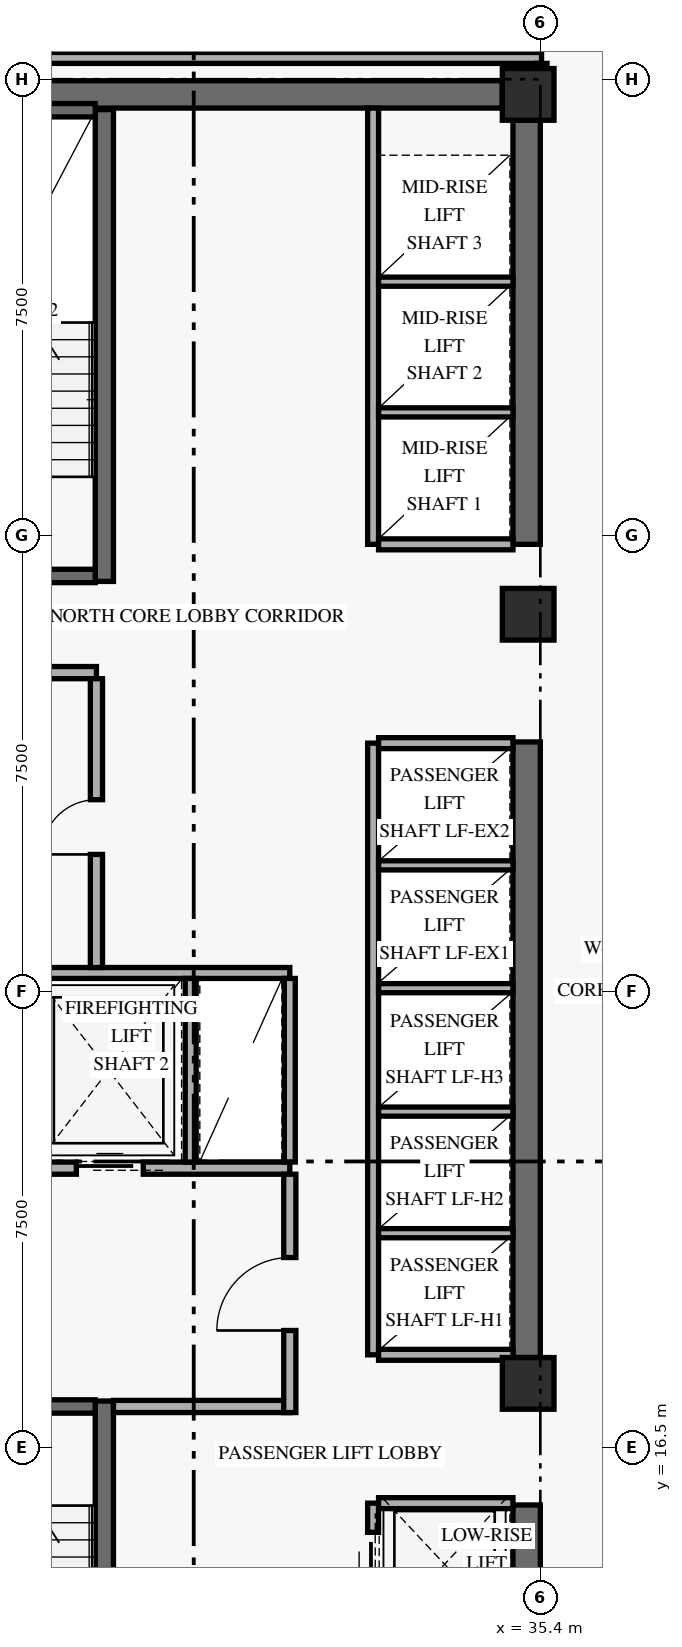
"""IFC4 building model, lengths in metres.
Left out: names, types, materials, properties, quantities, classifications, styles, units other than length and angle.
Written with IfcOpenShell. Run it as: python <this file> out.ifc"""

import sys

from ifc_helpers import new_model, si_unit, direction, frame, frame_2d, origin, origin_2d, place, context, subcontext, project, spatial, rectangle, extrude, element, fill, save


model = new_model("IFC4")
c1 = context("Model", 3, precision=1e-05, world=origin(), true_north=direction((0.0, 1.0)))
c2 = subcontext(c1, "Body", "Model", "MODEL_VIEW")
j1 = project(units=[si_unit("LENGTHUNIT", "METRE"), si_unit("PLANEANGLEUNIT", "RADIAN")], contexts=[c1])
p1 = place(None, origin())
s1 = spatial("IfcSite", under=j1, at=p1, CompositionType="ELEMENT")
p2 = place(p1, origin())
s2 = spatial("IfcBuilding", under=s1, at=p2, CompositionType="ELEMENT")
p3 = place(p2, frame((0.0, 0.0, 45.6)))
s3 = spatial("IfcBuildingStorey", under=s2, at=p3, CompositionType="ELEMENT", Elevation=45.6)
p4 = place(p3, frame((35.175, 9.675, 0.0), z_axis=(0.0, 0.0, 1.0), x_axis=(0.0, 1.0, 0.0)))
e1 = element("IfcWall", 1, at=p4, inside=s3, PredefinedType="SHEAR", context=c2, shape_type="SweptSolid", body=[
    extrude(rectangle(XDim=5.875, YDim=0.45, at=frame_2d((2.938, 0.0))), origin(), (0.0, 0.0, 1.0), 2.667),
])
p5 = place(p3, frame((35.175, 17.975, 0.0), z_axis=(0.0, 0.0, 1.0), x_axis=(0.0, 1.0, 0.0)))
e2 = element("IfcWall", 2, at=p5, inside=s3, PredefinedType="SHEAR", context=c2, shape_type="SweptSolid", body=[
    extrude(rectangle(XDim=10.125, YDim=0.45, at=frame_2d((5.062, 0.0))), origin(), (0.0, 0.0, 1.0), 2.667),
])
p6 = place(p3, frame((35.175, 31.35, 0.0), z_axis=(0.0, 0.0, 1.0), x_axis=(0.0, 1.0, 0.0)))
e3 = element("IfcWall", 3, at=p6, inside=s3, PredefinedType="SHEAR", context=c2, shape_type="SweptSolid", body=[
    extrude(rectangle(XDim=6.975, YDim=0.45, at=frame_2d((3.487, 0.0))), origin(), (0.0, 0.0, 1.0), 2.667),
])
p7 = place(p3, frame((24.625, 38.75, 0.0), z_axis=(0.0, 0.0, 1.0), x_axis=(1.0, 0.0, 0.0)))
e4 = element("IfcWall", 4, at=p7, inside=s3, PredefinedType="SHEAR", context=c2, shape_type="SweptSolid", body=[
    extrude(rectangle(XDim=10.15, YDim=0.45, at=frame_2d((5.075, 0.0))), origin(), (0.0, 0.0, 1.0), 3.36),
])
p8 = place(p3, frame((28.23, 9.5, 0.0), z_axis=(0.0, 0.0, 1.0), x_axis=(0.0, 1.0, 0.0)))
e5 = element("IfcWall", 5, at=p8, inside=s3, PredefinedType="SHEAR", context=c2, shape_type="SweptSolid", body=[
    extrude(rectangle(XDim=7.76, YDim=0.3, at=frame_2d((3.88, 0.0))), origin(), (0.0, 0.0, 1.0), 3.36),
])
p9 = place(p3, frame((24.92, 17.17, 0.0), z_axis=(0.0, 0.0, 1.0), x_axis=(1.0, 0.0, 0.0)))
e6 = element("IfcWall", 6, at=p9, inside=s3, PredefinedType="SHEAR", context=c2, shape_type="SweptSolid", body=[
    extrude(rectangle(XDim=3.16, YDim=0.22, at=frame_2d((1.58, 0.0))), origin(), (0.0, 0.0, 1.0), 3.36),
])
p10 = place(p9, frame((0.78, 0.0, 0.0)))
e7 = element("IfcOpeningElement", 7, at=p10, cuts=e6, PredefinedType="OPENING", context=c2, shape_type="SweptSolid", body=[
    extrude(rectangle(XDim=1.05, YDim=2.15, at=frame_2d((0.525, 1.075))), frame((0.0, 0.12, 0.0), z_axis=(0.0, -1.0, 0.0), x_axis=(1.0, 0.0, 0.0)), (0.0, 0.0, 1.0), 0.24),
])
p11 = place(p3, frame((28.23, 30.74, 0.0), z_axis=(0.0, 0.0, 1.0), x_axis=(0.0, 1.0, 0.0)))
e8 = element("IfcWall", 8, at=p11, inside=s3, PredefinedType="SHEAR", context=c2, shape_type="SweptSolid", body=[
    extrude(rectangle(XDim=7.76, YDim=0.3, at=frame_2d((3.88, 0.0))), origin(), (0.0, 0.0, 1.0), 3.36),
])
p12 = place(p3, frame((24.92, 30.83, 0.0), z_axis=(0.0, 0.0, 1.0), x_axis=(1.0, 0.0, 0.0)))
e9 = element("IfcWall", 9, at=p12, inside=s3, PredefinedType="SHEAR", context=c2, shape_type="SweptSolid", body=[
    extrude(rectangle(XDim=3.16, YDim=0.22, at=frame_2d((1.58, 0.0))), origin(), (0.0, 0.0, 1.0), 3.36),
])
p13 = place(p12, frame((0.78, 0.0, 0.0)))
e10 = element("IfcOpeningElement", 10, at=p13, cuts=e9, PredefinedType="OPENING", context=c2, shape_type="SweptSolid", body=[
    extrude(rectangle(XDim=1.05, YDim=2.15, at=frame_2d((0.525, 1.075))), frame((0.0, 0.12, 0.0), z_axis=(0.0, -1.0, 0.0), x_axis=(1.0, 0.0, 0.0)), (0.0, 0.0, 1.0), 0.24),
])
p14 = place(p3, frame((24.92, 38.49, 0.0), z_axis=(0.0, 0.0, 1.0), x_axis=(1.0, 0.0, 0.0)))
e11 = element("IfcWall", 11, at=p14, inside=s3, PredefinedType="SHEAR", context=c2, shape_type="SweptSolid", body=[
    extrude(rectangle(XDim=3.16, YDim=0.22, at=frame_2d((1.58, 0.0))), origin(), (0.0, 0.0, 1.0), 3.36),
])
for number, where, z_axis, x_axis in (
    (12, (35.2, 17.55, 0.0), (0.0, 0.0, 1.0), (1.0, 0.0, 0.0)),
    (13, (35.2, 30.2, 0.0), (0.0, 0.0, 1.0), (1.0, 0.0, 0.0)),
    (14, (35.2, 38.75, 0.0), (0.0, 0.0, 1.0), (1.0, 0.0, 0.0)),
):
    element("IfcColumn", number, at=place(p3, frame(where, z_axis=z_axis, x_axis=x_axis)), inside=s3, PredefinedType="COLUMN", context=c2, shape_type="SweptSolid", body=[
        extrude(rectangle(XDim=0.85, YDim=0.85, at=origin_2d()), origin(), (0.0, 0.0, 1.0), 3.6),
    ])
p15 = place(p3, frame((24.45, 21.09, 0.0), z_axis=(0.0, 0.0, 1.0), x_axis=(1.0, 0.0, 0.0)))
e15 = element("IfcWall", 15, at=p15, inside=s3, PredefinedType="STANDARD", context=c2, shape_type="SweptSolid", body=[
    extrude(rectangle(XDim=6.83, YDim=0.2, at=frame_2d((3.415, 0.0))), origin(), (0.0, 0.0, 1.0), 3.36),
])
p16 = place(p15, frame((0.72, 0.0, 0.0)))
e16 = element("IfcOpeningElement", 16, at=p16, cuts=e15, PredefinedType="OPENING", context=c2, shape_type="SweptSolid", body=[
    extrude(rectangle(XDim=1.1, YDim=2.2, at=frame_2d((0.55, 1.1))), frame((0.0, 0.11, 0.0), z_axis=(0.0, -1.0, 0.0), x_axis=(1.0, 0.0, 0.0)), (0.0, 0.0, 1.0), 0.22),
])
p17 = place(p15, frame((3.32, 0.0, 0.0)))
e17 = element("IfcOpeningElement", 17, at=p17, cuts=e15, PredefinedType="OPENING", context=c2, shape_type="SweptSolid", body=[
    extrude(rectangle(XDim=1.1, YDim=2.2, at=frame_2d((0.55, 1.1))), frame((0.0, 0.11, 0.0), z_axis=(0.0, -1.0, 0.0), x_axis=(1.0, 0.0, 0.0)), (0.0, 0.0, 1.0), 0.22),
])
p18 = place(p3, frame((28.38, 17.17, 0.0), z_axis=(0.0, 0.0, 1.0), x_axis=(1.0, 0.0, 0.0)))
e18 = element("IfcWall", 18, at=p18, inside=s3, PredefinedType="STANDARD", context=c2, shape_type="SweptSolid", body=[
    extrude(rectangle(XDim=2.9, YDim=0.2, at=frame_2d((1.45, 0.0))), origin(), (0.0, 0.0, 1.0), 3.36),
])
p19 = place(p3, frame((31.28, 17.07, 0.0), z_axis=(0.0, 0.0, 1.0), x_axis=(0.0, 1.0, 0.0)))
e19 = element("IfcWall", 19, at=p19, inside=s3, PredefinedType="STANDARD", context=c2, shape_type="SweptSolid", body=[
    extrude(rectangle(XDim=3.92, YDim=0.2, at=frame_2d((1.96, 0.0))), origin(), (0.0, 0.0, 1.0), 2.649),
])
p20 = place(p19, frame((1.35, 0.0, 0.0)))
e20 = element("IfcOpeningElement", 20, at=p20, cuts=e19, PredefinedType="OPENING", context=c2, shape_type="SweptSolid", body=[
    extrude(rectangle(XDim=1.2, YDim=2.15, at=frame_2d((0.6, 1.075))), frame((0.0, 0.11, 0.0), z_axis=(0.0, -1.0, 0.0), x_axis=(1.0, 0.0, 0.0)), (0.0, 0.0, 1.0), 0.22),
])
p21 = place(p3, frame((24.45, 24.3, 0.0), z_axis=(0.0, 0.0, 1.0), x_axis=(1.0, 0.0, 0.0)))
e21 = element("IfcWall", 21, at=p21, inside=s3, PredefinedType="STANDARD", context=c2, shape_type="SweptSolid", body=[
    extrude(rectangle(XDim=6.83, YDim=0.18, at=frame_2d((3.415, 0.0))), origin(), (0.0, 0.0, 1.0), 3.36),
])
for number, where, z_axis, x_axis in (
    (22, (29.65, 21.19, 0.0), (0.0, 0.0, 1.0), (0.0, 1.0, 0.0)),
    (23, (31.28, 21.19, 0.0), (0.0, 0.0, 1.0), (0.0, 1.0, 0.0)),
):
    element("IfcWall", number, at=place(p3, frame(where, z_axis=z_axis, x_axis=x_axis)), inside=s3, PredefinedType="STANDARD", context=c2, shape_type="SweptSolid", body=[
        extrude(rectangle(XDim=3.02, YDim=0.18, at=frame_2d((1.51, 0.0))), origin(), (0.0, 0.0, 1.0), 3.36),
    ])
p22 = place(p3, frame((24.45, 29.24, 0.0), z_axis=(0.0, 0.0, 1.0), x_axis=(1.0, 0.0, 0.0)))
e24 = element("IfcWall", 24, at=p22, inside=s3, PredefinedType="STANDARD", context=c2, shape_type="SweptSolid", body=[
    extrude(rectangle(XDim=3.65, YDim=0.2, at=frame_2d((1.825, 0.0))), origin(), (0.0, 0.0, 1.0), 3.36),
])
p23 = place(p3, frame((28.1, 24.39, 0.0), z_axis=(0.0, 0.0, 1.0), x_axis=(0.0, 1.0, 0.0)))
e25 = element("IfcWall", 25, at=p23, inside=s3, PredefinedType="STANDARD", context=c2, shape_type="SweptSolid", body=[
    extrude(rectangle(XDim=4.75, YDim=0.2, at=frame_2d((2.375, 0.0))), origin(), (0.0, 0.0, 1.0), 3.36),
])
p24 = place(p23, frame((1.86, 0.0, 0.0)))
e26 = element("IfcOpeningElement", 26, at=p24, cuts=e25, PredefinedType="OPENING", context=c2, shape_type="SweptSolid", body=[
    extrude(rectangle(XDim=0.9, YDim=2.1, at=frame_2d((0.45, 1.05))), frame((0.0, 0.11, 0.0), z_axis=(0.0, -1.0, 0.0), x_axis=(1.0, 0.0, 0.0)), (0.0, 0.0, 1.0), 0.22),
])
p25 = place(p3, frame((32.65, 9.5, 0.0), z_axis=(0.0, 0.0, 1.0), x_axis=(0.0, 1.0, 0.0)))
e27 = element("IfcWall", 27, at=p25, inside=s3, PredefinedType="STANDARD", context=c2, shape_type="SweptSolid", body=[
    extrude(rectangle(XDim=6.08, YDim=0.18, at=frame_2d((3.04, 0.0))), origin(), (0.0, 0.0, 1.0), 3.36),
])
p26 = place(p25, frame((0.55, 0.0, 0.0)))
e28 = element("IfcOpeningElement", 28, at=p26, cuts=e27, PredefinedType="OPENING", context=c2, shape_type="SweptSolid", body=[
    extrude(rectangle(XDim=1.05, YDim=2.2, at=frame_2d((0.525, 1.1))), frame((0.0, 0.1, 0.0), z_axis=(0.0, -1.0, 0.0), x_axis=(1.0, 0.0, 0.0)), (0.0, 0.0, 1.0), 0.2),
])
p27 = place(p25, frame((2.55, 0.0, 0.0)))
e29 = element("IfcOpeningElement", 29, at=p27, cuts=e27, PredefinedType="OPENING", context=c2, shape_type="SweptSolid", body=[
    extrude(rectangle(XDim=1.05, YDim=2.2, at=frame_2d((0.525, 1.1))), frame((0.0, 0.1, 0.0), z_axis=(0.0, -1.0, 0.0), x_axis=(1.0, 0.0, 0.0)), (0.0, 0.0, 1.0), 0.2),
])
p28 = place(p25, frame((4.55, 0.0, 0.0)))
e30 = element("IfcOpeningElement", 30, at=p28, cuts=e27, PredefinedType="OPENING", context=c2, shape_type="SweptSolid", body=[
    extrude(rectangle(XDim=1.05, YDim=2.2, at=frame_2d((0.525, 1.1))), frame((0.0, 0.1, 0.0), z_axis=(0.0, -1.0, 0.0), x_axis=(1.0, 0.0, 0.0)), (0.0, 0.0, 1.0), 0.2),
])
p29 = place(p3, frame((32.74, 15.58, 0.0), z_axis=(0.0, 0.0, 1.0), x_axis=(1.0, 0.0, 0.0)))
e31 = element("IfcWall", 31, at=p29, inside=s3, PredefinedType="STANDARD", context=c2, shape_type="SweptSolid", body=[
    extrude(rectangle(XDim=2.21, YDim=0.18, at=frame_2d((1.105, 0.0))), origin(), (0.0, 0.0, 1.0), 3.36),
])
p30 = place(p3, frame((32.65, 18.02, 0.0), z_axis=(0.0, 0.0, 1.0), x_axis=(0.0, 1.0, 0.0)))
e32 = element("IfcWall", 32, at=p30, inside=s3, PredefinedType="STANDARD", context=c2, shape_type="SweptSolid", body=[
    extrude(rectangle(XDim=10.06, YDim=0.18, at=frame_2d((5.03, 0.0))), origin(), (0.0, 0.0, 1.0), 3.36),
])
for number, where, z_axis, x_axis in (
    (33, (32.74, 18.02, 0.0), (0.0, 0.0, 1.0), (1.0, 0.0, 0.0)),
    (34, (32.74, 28.08, 0.0), (0.0, 0.0, 1.0), (1.0, 0.0, 0.0)),
):
    element("IfcWall", number, at=place(p3, frame(where, z_axis=z_axis, x_axis=x_axis)), inside=s3, PredefinedType="STANDARD", context=c2, shape_type="SweptSolid", body=[
        extrude(rectangle(XDim=2.21, YDim=0.18, at=frame_2d((1.105, 0.0))), origin(), (0.0, 0.0, 1.0), 3.36),
    ])
for number, where, z_axis, x_axis in (
    (35, (32.74, 20.02, 0.0), (0.0, 0.0, 1.0), (1.0, 0.0, 0.0)),
    (36, (32.74, 22.02, 0.0), (0.0, 0.0, 1.0), (1.0, 0.0, 0.0)),
    (37, (32.74, 24.05, 0.0), (0.0, 0.0, 1.0), (1.0, 0.0, 0.0)),
    (38, (32.74, 26.07, 0.0), (0.0, 0.0, 1.0), (1.0, 0.0, 0.0)),
):
    element("IfcWall", number, at=place(p3, frame(where, z_axis=z_axis, x_axis=x_axis)), inside=s3, PredefinedType="STANDARD", context=c2, shape_type="SweptSolid", body=[
        extrude(rectangle(XDim=2.21, YDim=0.15, at=frame_2d((1.105, 0.0))), origin(), (0.0, 0.0, 1.0), 3.36),
    ])
p31 = place(p3, frame((32.65, 31.35, 0.0), z_axis=(0.0, 0.0, 1.0), x_axis=(0.0, 1.0, 0.0)))
e39 = element("IfcWall", 39, at=p31, inside=s3, PredefinedType="STANDARD", context=c2, shape_type="SweptSolid", body=[
    extrude(rectangle(XDim=7.175, YDim=0.18, at=frame_2d((3.587, 0.0))), origin(), (0.0, 0.0, 1.0), 3.36),
])
p32 = place(p3, frame((32.74, 31.35, 0.0), z_axis=(0.0, 0.0, 1.0), x_axis=(1.0, 0.0, 0.0)))
e40 = element("IfcWall", 40, at=p32, inside=s3, PredefinedType="STANDARD", context=c2, shape_type="SweptSolid", body=[
    extrude(rectangle(XDim=2.21, YDim=0.18, at=frame_2d((1.105, 0.0))), origin(), (0.0, 0.0, 1.0), 3.36),
])
for number, where, z_axis, x_axis in (
    (41, (32.74, 33.52, 0.0), (0.0, 0.0, 1.0), (1.0, 0.0, 0.0)),
    (42, (32.74, 35.67, 0.0), (0.0, 0.0, 1.0), (1.0, 0.0, 0.0)),
):
    element("IfcWall", number, at=place(p3, frame(where, z_axis=z_axis, x_axis=x_axis)), inside=s3, PredefinedType="STANDARD", context=c2, shape_type="SweptSolid", body=[
        extrude(rectangle(XDim=2.21, YDim=0.15, at=frame_2d((1.105, 0.0))), origin(), (0.0, 0.0, 1.0), 3.36),
    ])
p33 = place(p3, frame((23.75, 39.35, 0.0), z_axis=(0.0, 0.0, 1.0), x_axis=(1.0, 0.0, 0.0)))
e43 = element("IfcWall", 43, at=p33, inside=s3, PredefinedType="STANDARD", context=c2, shape_type="SweptSolid", body=[
    extrude(rectangle(XDim=11.67, YDim=0.18, at=frame_2d((5.835, 0.0))), origin(), (0.0, 0.0, 1.0), 2.649),
])
p34 = place(p3, frame((35.42, 38.75, 0.0), z_axis=(0.0, 0.0, 1.0), x_axis=(0.0, 1.0, 0.0)))
e44 = element("IfcWall", 44, at=p34, inside=s3, PredefinedType="STANDARD", context=c2, shape_type="SweptSolid", body=[
    extrude(rectangle(XDim=0.51, YDim=0.18, at=frame_2d((0.255, 0.0))), origin(), (0.0, 0.0, 1.0), 3.36),
])
p35 = place(p17, origin())
e45 = element("IfcDoor", 45, at=p35, inside=s3, OperationType="SLIDING_TO_LEFT", PredefinedType="DOOR", context=c2, shape_type="SweptSolid", body=[
    extrude(rectangle(XDim=1.1, YDim=2.2, at=frame_2d((0.55, 1.1))), frame((0.0, 0.025, 0.0), z_axis=(0.0, -1.0, 0.0), x_axis=(1.0, 0.0, 0.0)), (0.0, 0.0, 1.0), 0.05),
])
fill(e17, e45)
p36 = place(p20, origin())
e46 = element("IfcDoor", 46, at=p36, inside=s3, OperationType="SINGLE_SWING_LEFT", PredefinedType="DOOR", context=c2, shape_type="SweptSolid", body=[
    extrude(rectangle(XDim=1.2, YDim=2.15, at=frame_2d((0.6, 1.075))), frame((0.0, 0.025, 0.0), z_axis=(0.0, -1.0, 0.0), x_axis=(1.0, 0.0, 0.0)), (0.0, 0.0, 1.0), 0.05),
])
fill(e20, e46)
p37 = place(p24, origin())
e47 = element("IfcDoor", 47, at=p37, inside=s3, OperationType="SINGLE_SWING_LEFT", PredefinedType="DOOR", context=c2, shape_type="SweptSolid", body=[
    extrude(rectangle(XDim=0.9, YDim=2.1, at=frame_2d((0.45, 1.05))), frame((0.0, 0.025, 0.0), z_axis=(0.0, -1.0, 0.0), x_axis=(1.0, 0.0, 0.0)), (0.0, 0.0, 1.0), 0.05),
])
fill(e26, e47)
p38 = place(p28, origin())
e48 = element("IfcDoor", 48, at=p38, inside=s3, OperationType="SLIDING_TO_LEFT", PredefinedType="DOOR", context=c2, shape_type="SweptSolid", body=[
    extrude(rectangle(XDim=1.05, YDim=2.2, at=frame_2d((0.525, 1.1))), frame((0.0, 0.025, 0.0), z_axis=(0.0, -1.0, 0.0), x_axis=(1.0, 0.0, 0.0)), (0.0, 0.0, 1.0), 0.05),
])
fill(e30, e48)
save(model, sys.argv[1])
